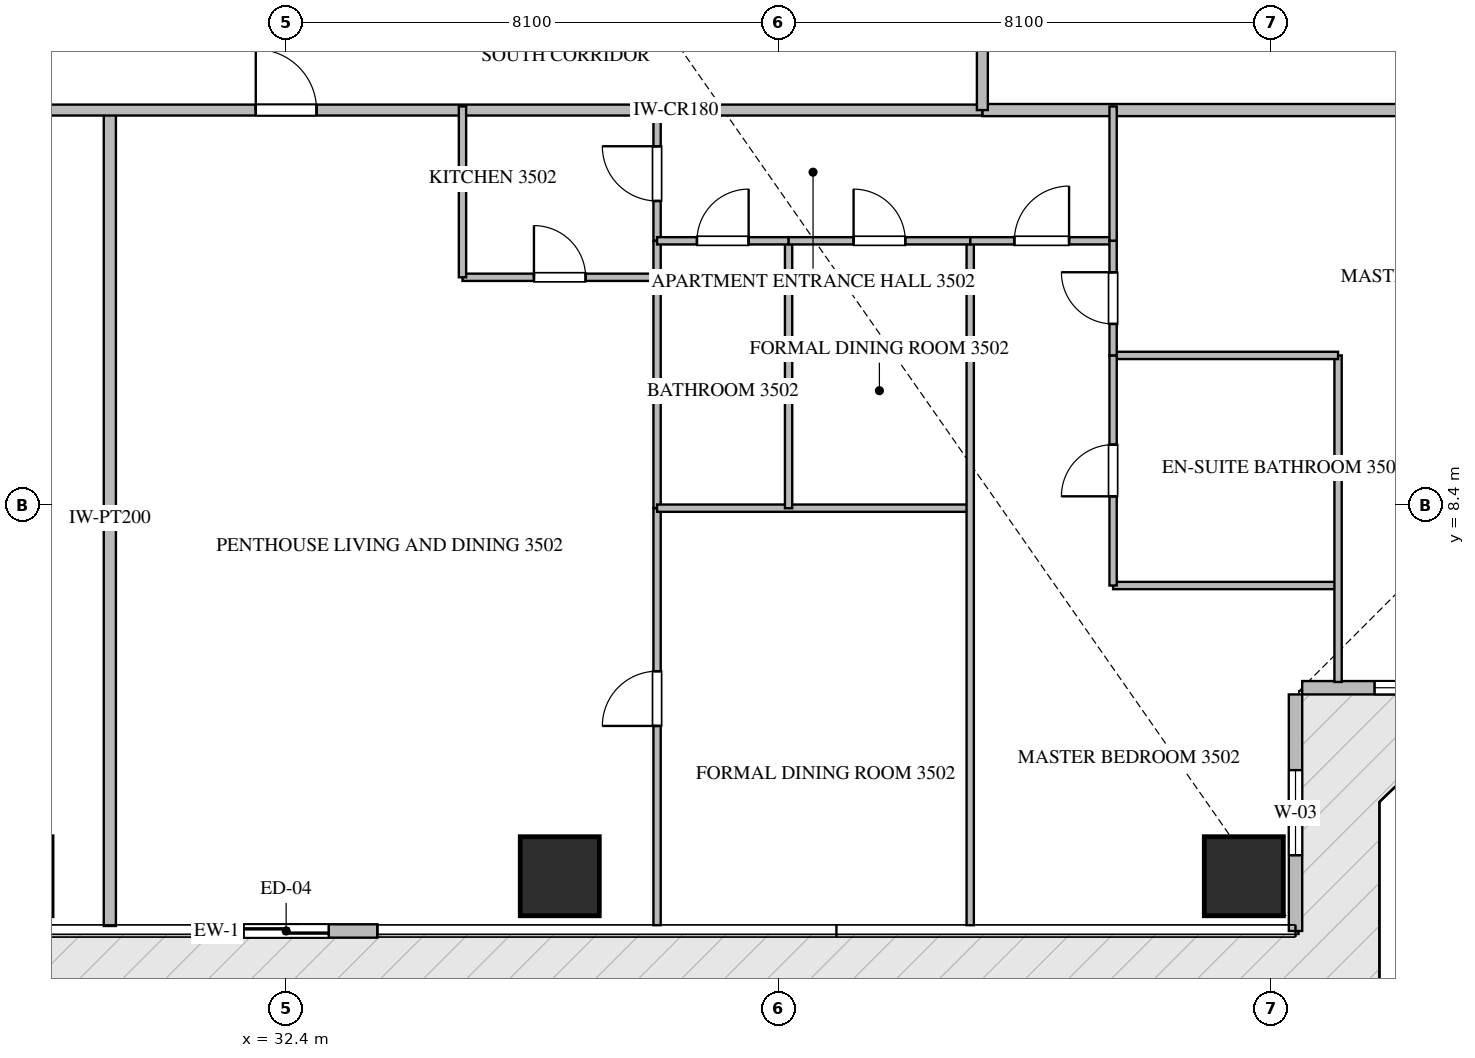
"""IFC4 building model, lengths in metres.
Left out: names, types, materials, properties, quantities, classifications, styles, units other than length and angle.
Written with IfcOpenShell. Run it as: python <this file> out.ifc"""

import sys

from ifc_helpers import new_model, si_unit, direction, frame, frame_2d, origin, origin_2d, place, context, subcontext, project, spatial, rectangle, extrude, source, transform, mapped, element, fill, save


model = new_model("IFC4")
c1 = context("Model", 3, precision=1e-05, world=origin(), true_north=direction((0.0, 1.0)))
c2 = subcontext(c1, "Body", "Model", "MODEL_VIEW")
j1 = project(units=[si_unit("LENGTHUNIT", "METRE"), si_unit("PLANEANGLEUNIT", "RADIAN")], contexts=[c1])
p1 = place(None, origin())
s1 = spatial("IfcSite", under=j1, at=p1, CompositionType="ELEMENT")
p2 = place(p1, origin())
s2 = spatial("IfcBuilding", under=s1, at=p2, CompositionType="ELEMENT")
p3 = place(p2, frame((0.0, 0.0, 142.65)))
s3 = spatial("IfcBuildingStorey", under=s2, at=p3, CompositionType="ELEMENT", Elevation=142.65)
m1 = source(origin(), c2, "Body", "SweptSolid", [
    extrude(rectangle(XDim=1.3, YDim=1.3, at=origin_2d()), origin(), (0.0, 0.0, 1.0), 3.75),
])
for number, where, z_axis, x_axis in (
    (1, (36.9, 2.3, -0.26), (0.0, 0.0, 1.0), (1.0, 0.0, 0.0)),
    (2, (48.15, 2.3, -0.26), (0.0, 0.0, 1.0), (1.0, 0.0, 0.0)),
):
    element("IfcColumn", number, at=place(p3, frame(where, z_axis=z_axis, x_axis=x_axis)), inside=s3, PredefinedType="COLUMN", context=c2, shape_type="MappedRepresentation", body=[
        mapped(m1, transform((0.0, 0.0, 0.0), scale=1.0)),
    ])
p4 = place(p3, frame((30.9, 1.4, 0.0), z_axis=(0.0, 0.0, 1.0), x_axis=(1.0, 0.0, 0.0)))
e3 = element("IfcWall", 3, at=p4, inside=s3, PredefinedType="ELEMENTEDWALL", context=c2, shape_type="SweptSolid", body=[
    extrude(rectangle(XDim=3.0, YDim=0.22, at=frame_2d((1.5, 0.0))), origin(), (0.0, 0.0, 1.0), 3.475),
])
p5 = place(p4, frame((0.8, 0.0, 0.0)))
e4 = element("IfcOpeningElement", 4, at=p5, cuts=e3, PredefinedType="OPENING", context=c2, shape_type="SweptSolid", body=[
    extrude(rectangle(XDim=1.4, YDim=2.25, at=frame_2d((0.7, 1.125))), frame((0.0, 0.12, 0.0), z_axis=(0.0, -1.0, 0.0), x_axis=(1.0, 0.0, 0.0)), (0.0, 0.0, 1.0), 0.24),
])
p6 = place(p3, frame((49.0, 1.4, 0.0), z_axis=(0.0, 0.0, 1.0), x_axis=(0.0, 1.0, 0.0)))
e5 = element("IfcWall", 5, at=p6, inside=s3, PredefinedType="ELEMENTEDWALL", context=c2, shape_type="SweptSolid", body=[
    extrude(rectangle(XDim=3.89, YDim=0.22, at=frame_2d((1.945, 0.0))), origin(), (0.0, 0.0, 1.0), 3.475),
])
p7 = place(p6, frame((1.245, 0.0, 0.65)))
e6 = element("IfcOpeningElement", 6, at=p7, cuts=e5, PredefinedType="OPENING", context=c2, shape_type="SweptSolid", body=[
    extrude(rectangle(XDim=1.4, YDim=2.05, at=frame_2d((0.7, 1.025))), frame((0.0, 0.12, 0.0), z_axis=(0.0, -1.0, 0.0), x_axis=(1.0, 0.0, 0.0)), (0.0, 0.0, 1.0), 0.24),
])
p8 = place(p3, frame((49.11, 5.4, 0.0), z_axis=(0.0, 0.0, 1.0), x_axis=(1.0, 0.0, 0.0)))
e7 = element("IfcWall", 7, at=p8, inside=s3, PredefinedType="ELEMENTEDWALL", context=c2, shape_type="SweptSolid", body=[
    extrude(rectangle(XDim=3.78, YDim=0.22, at=frame_2d((1.89, 0.0))), origin(), (0.0, 0.0, 1.0), 3.475),
])
p9 = place(p8, frame((1.19, 0.0, 0.65)))
e8 = element("IfcOpeningElement", 8, at=p9, cuts=e7, PredefinedType="OPENING", context=c2, shape_type="SweptSolid", body=[
    extrude(rectangle(XDim=1.4, YDim=2.05, at=frame_2d((0.7, 1.025))), frame((0.0, 0.12, 0.0), z_axis=(0.0, -1.0, 0.0), x_axis=(1.0, 0.0, 0.0)), (0.0, 0.0, 1.0), 0.24),
])
p10 = place(p3, frame((29.5, 1.482, 0.0), z_axis=(0.0, 0.0, 1.0), x_axis=(0.0, 1.0, 0.0)))
e9 = element("IfcWall", 9, at=p10, inside=s3, PredefinedType="PARTITIONING", context=c2, shape_type="SweptSolid", body=[
    extrude(rectangle(XDim=13.418, YDim=0.2, at=frame_2d((6.709, 0.0))), origin(), (0.0, 0.0, 1.0), 3.49),
])
p11 = place(p3, frame((43.85, 14.9, 0.0), z_axis=(0.0, 0.0, 1.0), x_axis=(1.0, 0.0, 0.0)))
e10 = element("IfcWall", 10, at=p11, inside=s3, PredefinedType="PARTITIONING", context=c2, shape_type="SweptSolid", body=[
    extrude(rectangle(XDim=13.068, YDim=0.2, at=frame_2d((6.534, 0.0))), origin(), (0.0, 0.0, 1.0), 3.49),
])
p12 = place(p3, frame((20.952, 14.9, 0.0), z_axis=(0.0, 0.0, 1.0), x_axis=(1.0, 0.0, 0.0)))
e11 = element("IfcWall", 11, at=p12, inside=s3, PredefinedType="PARTITIONING", context=c2, shape_type="SweptSolid", body=[
    extrude(rectangle(XDim=22.896, YDim=0.18, at=frame_2d((11.448, 0.0))), origin(), (0.0, 0.0, 1.0), 3.49),
])
p13 = place(p12, frame((5.386, 0.0, 0.0)))
e12 = element("IfcOpeningElement", 12, at=p13, cuts=e11, PredefinedType="OPENING", context=c2, shape_type="SweptSolid", body=[
    extrude(rectangle(XDim=1.0, YDim=2.15, at=frame_2d((0.5, 1.075))), frame((0.0, 0.1, 0.0), z_axis=(0.0, -1.0, 0.0), x_axis=(1.0, 0.0, 0.0)), (0.0, 0.0, 1.0), 0.2),
])
p14 = place(p12, frame((10.948, 0.0, 0.0)))
e13 = element("IfcOpeningElement", 13, at=p14, cuts=e11, PredefinedType="OPENING", context=c2, shape_type="SweptSolid", body=[
    extrude(rectangle(XDim=1.0, YDim=2.15, at=frame_2d((0.5, 1.075))), frame((0.0, 0.1, 0.0), z_axis=(0.0, -1.0, 0.0), x_axis=(1.0, 0.0, 0.0)), (0.0, 0.0, 1.0), 0.2),
])
p15 = place(p3, frame((43.85, 14.9, 0.0), z_axis=(0.0, 0.0, 1.0), x_axis=(0.0, 1.0, 0.0)))
e14 = element("IfcWall", 14, at=p15, inside=s3, PredefinedType="PARTITIONING", context=c2, shape_type="SweptSolid", body=[
    extrude(rectangle(XDim=18.7, YDim=0.18, at=frame_2d((9.35, 0.0))), origin(), (0.0, 0.0, 1.0), 3.49),
])
p16 = place(p15, frame((1.805, 0.0, 0.0)))
e15 = element("IfcOpeningElement", 15, at=p16, cuts=e14, PredefinedType="OPENING", context=c2, shape_type="SweptSolid", body=[
    extrude(rectangle(XDim=1.0, YDim=2.15, at=frame_2d((0.5, 1.075))), frame((0.0, 0.1, 0.0), z_axis=(0.0, -1.0, 0.0), x_axis=(1.0, 0.0, 0.0)), (0.0, 0.0, 1.0), 0.2),
])
p17 = place(p15, frame((15.222, 0.0, 0.0)))
e16 = element("IfcOpeningElement", 16, at=p17, cuts=e14, PredefinedType="OPENING", context=c2, shape_type="SweptSolid", body=[
    extrude(rectangle(XDim=1.0, YDim=2.15, at=frame_2d((0.5, 1.075))), frame((0.0, 0.1, 0.0), z_axis=(0.0, -1.0, 0.0), x_axis=(1.0, 0.0, 0.0)), (0.0, 0.0, 1.0), 0.2),
])
p18 = place(p3, frame((35.3, 12.15, 0.0), z_axis=(0.0, 0.0, 1.0), x_axis=(1.0, 0.0, 0.0)))
e17 = element("IfcWall", 17, at=p18, inside=s3, PredefinedType="PARTITIONING", context=c2, shape_type="SweptSolid", body=[
    extrude(rectangle(XDim=3.2, YDim=0.12, at=frame_2d((1.6, 0.0))), origin(), (0.0, 0.0, 1.0), 3.49),
])
p19 = place(p18, frame((1.175, 0.0, 0.0)))
e18 = element("IfcOpeningElement", 18, at=p19, cuts=e17, PredefinedType="OPENING", context=c2, shape_type="SweptSolid", body=[
    extrude(rectangle(XDim=0.85, YDim=2.1, at=frame_2d((0.425, 1.05))), frame((0.0, 0.07, 0.0), z_axis=(0.0, -1.0, 0.0), x_axis=(1.0, 0.0, 0.0)), (0.0, 0.0, 1.0), 0.14),
])
p20 = place(p3, frame((35.3, 12.15, 0.0), z_axis=(0.0, 0.0, 1.0), x_axis=(0.0, 1.0, 0.0)))
e19 = element("IfcWall", 19, at=p20, inside=s3, PredefinedType="PARTITIONING", context=c2, shape_type="SweptSolid", body=[
    extrude(rectangle(XDim=2.81, YDim=0.12, at=frame_2d((1.405, 0.0))), origin(), (0.0, 0.0, 1.0), 3.49),
])
p21 = place(p3, frame((38.5, 12.75, 0.0), z_axis=(0.0, 0.0, 1.0), x_axis=(0.0, 1.0, 0.0)))
e20 = element("IfcWall", 20, at=p21, inside=s3, PredefinedType="PARTITIONING", context=c2, shape_type="SweptSolid", body=[
    extrude(rectangle(XDim=2.21, YDim=0.12, at=frame_2d((1.105, 0.0))), origin(), (0.0, 0.0, 1.0), 3.49),
])
p22 = place(p21, frame((0.655, 0.0, 0.0)))
e21 = element("IfcOpeningElement", 21, at=p22, cuts=e20, PredefinedType="OPENING", context=c2, shape_type="SweptSolid", body=[
    extrude(rectangle(XDim=0.9, YDim=2.1, at=frame_2d((0.45, 1.05))), frame((0.0, 0.07, 0.0), z_axis=(0.0, -1.0, 0.0), x_axis=(1.0, 0.0, 0.0)), (0.0, 0.0, 1.0), 0.14),
])
p23 = place(p3, frame((38.5, 1.495, 0.0), z_axis=(0.0, 0.0, 1.0), x_axis=(0.0, 1.0, 0.0)))
e22 = element("IfcWall", 22, at=p23, inside=s3, PredefinedType="PARTITIONING", context=c2, shape_type="SweptSolid", body=[
    extrude(rectangle(XDim=6.858, YDim=0.12, at=frame_2d((3.429, 0.0))), origin(), (0.0, 0.0, 1.0), 3.49),
])
p24 = place(p23, frame((3.277, 0.0, 0.0)))
e23 = element("IfcOpeningElement", 23, at=p24, cuts=e22, PredefinedType="OPENING", context=c2, shape_type="SweptSolid", body=[
    extrude(rectangle(XDim=0.9, YDim=2.1, at=frame_2d((0.45, 1.05))), frame((0.0, 0.07, 0.0), z_axis=(0.0, -1.0, 0.0), x_axis=(1.0, 0.0, 0.0)), (0.0, 0.0, 1.0), 0.14),
])
p25 = place(p3, frame((38.5, 8.355, 0.0), z_axis=(0.0, 0.0, 1.0), x_axis=(0.0, 1.0, 0.0)))
e24 = element("IfcWall", 24, at=p25, inside=s3, PredefinedType="PARTITIONING", context=c2, shape_type="SweptSolid", body=[
    extrude(rectangle(XDim=4.393, YDim=0.12, at=frame_2d((2.197, 0.0))), origin(), (0.0, 0.0, 1.0), 3.49),
])
p26 = place(p3, frame((38.5, 8.353, 0.0), z_axis=(0.0, 0.0, 1.0), x_axis=(1.0, 0.0, 0.0)))
e25 = element("IfcWall", 25, at=p26, inside=s3, PredefinedType="PARTITIONING", context=c2, shape_type="SweptSolid", body=[
    extrude(rectangle(XDim=5.15, YDim=0.12, at=frame_2d((2.575, 0.0))), origin(), (0.0, 0.0, 1.0), 3.49),
])
p27 = place(p3, frame((43.65, 1.495, 0.0), z_axis=(0.0, 0.0, 1.0), x_axis=(0.0, 1.0, 0.0)))
e26 = element("IfcWall", 26, at=p27, inside=s3, PredefinedType="PARTITIONING", context=c2, shape_type="SweptSolid", body=[
    extrude(rectangle(XDim=11.255, YDim=0.12, at=frame_2d((5.627, 0.0))), origin(), (0.0, 0.0, 1.0), 3.49),
])
p28 = place(p3, frame((40.663, 8.353, 0.0), z_axis=(0.0, 0.0, 1.0), x_axis=(0.0, 1.0, 0.0)))
e27 = element("IfcWall", 27, at=p28, inside=s3, PredefinedType="PARTITIONING", context=c2, shape_type="SweptSolid", body=[
    extrude(rectangle(XDim=4.397, YDim=0.12, at=frame_2d((2.198, 0.0))), origin(), (0.0, 0.0, 1.0), 3.49),
])
p29 = place(p3, frame((38.5, 12.75, 0.0), z_axis=(0.0, 0.0, 1.0), x_axis=(1.0, 0.0, 0.0)))
e28 = element("IfcWall", 28, at=p29, inside=s3, PredefinedType="PARTITIONING", context=c2, shape_type="SweptSolid", body=[
    extrude(rectangle(XDim=2.163, YDim=0.12, at=frame_2d((1.082, 0.0))), origin(), (0.0, 0.0, 1.0), 3.49),
])
p30 = place(p29, frame((0.656, 0.0, 0.0)))
e29 = element("IfcOpeningElement", 29, at=p30, cuts=e28, PredefinedType="OPENING", context=c2, shape_type="SweptSolid", body=[
    extrude(rectangle(XDim=0.85, YDim=2.1, at=frame_2d((0.425, 1.05))), frame((0.0, 0.07, 0.0), z_axis=(0.0, -1.0, 0.0), x_axis=(1.0, 0.0, 0.0)), (0.0, 0.0, 1.0), 0.14),
])
p31 = place(p3, frame((40.665, 12.75, 0.0), z_axis=(0.0, 0.0, 1.0), x_axis=(1.0, 0.0, 0.0)))
e30 = element("IfcWall", 30, at=p31, inside=s3, PredefinedType="PARTITIONING", context=c2, shape_type="SweptSolid", body=[
    extrude(rectangle(XDim=2.985, YDim=0.12, at=frame_2d((1.492, 0.0))), origin(), (0.0, 0.0, 1.0), 3.49),
])
p32 = place(p31, frame((1.067, 0.0, 0.0)))
e31 = element("IfcOpeningElement", 31, at=p32, cuts=e30, PredefinedType="OPENING", context=c2, shape_type="SweptSolid", body=[
    extrude(rectangle(XDim=0.85, YDim=2.1, at=frame_2d((0.425, 1.05))), frame((0.0, 0.07, 0.0), z_axis=(0.0, -1.0, 0.0), x_axis=(1.0, 0.0, 0.0)), (0.0, 0.0, 1.0), 0.14),
])
p33 = place(p3, frame((43.652, 12.75, 0.0), z_axis=(0.0, 0.0, 1.0), x_axis=(1.0, 0.0, 0.0)))
e32 = element("IfcWall", 32, at=p33, inside=s3, PredefinedType="PARTITIONING", context=c2, shape_type="SweptSolid", body=[
    extrude(rectangle(XDim=2.348, YDim=0.12, at=frame_2d((1.174, 0.0))), origin(), (0.0, 0.0, 1.0), 3.49),
])
p34 = place(p33, frame((0.724, 0.0, 0.0)))
e33 = element("IfcOpeningElement", 33, at=p34, cuts=e32, PredefinedType="OPENING", context=c2, shape_type="SweptSolid", body=[
    extrude(rectangle(XDim=0.9, YDim=2.1, at=frame_2d((0.45, 1.05))), frame((0.0, 0.07, 0.0), z_axis=(0.0, -1.0, 0.0), x_axis=(1.0, 0.0, 0.0)), (0.0, 0.0, 1.0), 0.14),
])
p35 = place(p3, frame((46.0, 7.081, 0.0), z_axis=(0.0, 0.0, 1.0), x_axis=(1.0, 0.0, 0.0)))
e34 = element("IfcWall", 34, at=p35, inside=s3, PredefinedType="PARTITIONING", context=c2, shape_type="SweptSolid", body=[
    extrude(rectangle(XDim=3.7, YDim=0.12, at=frame_2d((1.85, 0.0))), origin(), (0.0, 0.0, 1.0), 3.49),
])
p36 = place(p3, frame((49.7, 5.495, 0.0), z_axis=(0.0, 0.0, 1.0), x_axis=(0.0, 1.0, 0.0)))
e35 = element("IfcWall", 35, at=p36, inside=s3, PredefinedType="PARTITIONING", context=c2, shape_type="SweptSolid", body=[
    extrude(rectangle(XDim=5.37, YDim=0.12, at=frame_2d((2.685, 0.0))), origin(), (0.0, 0.0, 1.0), 3.49),
])
p37 = place(p3, frame((46.0, 10.865, 0.0), z_axis=(0.0, 0.0, 1.0), x_axis=(1.0, 0.0, 0.0)))
e36 = element("IfcWall", 36, at=p37, inside=s3, PredefinedType="PARTITIONING", context=c2, shape_type="SweptSolid", body=[
    extrude(rectangle(XDim=3.7, YDim=0.12, at=frame_2d((1.85, 0.0))), origin(), (0.0, 0.0, 1.0), 3.49),
])
p38 = place(p3, frame((46.0, 7.081, 0.0), z_axis=(0.0, 0.0, 1.0), x_axis=(0.0, 1.0, 0.0)))
e37 = element("IfcWall", 37, at=p38, inside=s3, PredefinedType="PARTITIONING", context=c2, shape_type="SweptSolid", body=[
    extrude(rectangle(XDim=3.784, YDim=0.12, at=frame_2d((1.892, 0.0))), origin(), (0.0, 0.0, 1.0), 3.49),
])
p39 = place(p38, frame((1.467, 0.0, 0.0)))
e38 = element("IfcOpeningElement", 38, at=p39, cuts=e37, PredefinedType="OPENING", context=c2, shape_type="SweptSolid", body=[
    extrude(rectangle(XDim=0.85, YDim=2.1, at=frame_2d((0.425, 1.05))), frame((0.0, 0.07, 0.0), z_axis=(0.0, -1.0, 0.0), x_axis=(1.0, 0.0, 0.0)), (0.0, 0.0, 1.0), 0.14),
])
p40 = place(p3, frame((46.0, 10.867, 0.0), z_axis=(0.0, 0.0, 1.0), x_axis=(0.0, 1.0, 0.0)))
e39 = element("IfcWall", 39, at=p40, inside=s3, PredefinedType="PARTITIONING", context=c2, shape_type="SweptSolid", body=[
    extrude(rectangle(XDim=1.883, YDim=0.12, at=frame_2d((0.941, 0.0))), origin(), (0.0, 0.0, 1.0), 3.49),
])
p41 = place(p40, frame((0.516, 0.0, 0.0)))
e40 = element("IfcOpeningElement", 40, at=p41, cuts=e39, PredefinedType="OPENING", context=c2, shape_type="SweptSolid", body=[
    extrude(rectangle(XDim=0.85, YDim=2.1, at=frame_2d((0.425, 1.05))), frame((0.0, 0.07, 0.0), z_axis=(0.0, -1.0, 0.0), x_axis=(1.0, 0.0, 0.0)), (0.0, 0.0, 1.0), 0.14),
])
p42 = place(p3, frame((46.0, 12.752, 0.0), z_axis=(0.0, 0.0, 1.0), x_axis=(0.0, 1.0, 0.0)))
e41 = element("IfcWall", 41, at=p42, inside=s3, PredefinedType="PARTITIONING", context=c2, shape_type="SweptSolid", body=[
    extrude(rectangle(XDim=2.208, YDim=0.12, at=frame_2d((1.104, 0.0))), origin(), (0.0, 0.0, 1.0), 3.49),
])
m2 = source(origin(), c2, "Body", "SweptSolid", [
    extrude(rectangle(XDim=1.4, YDim=2.25, at=frame_2d((0.7, 1.125))), frame((0.0, 0.025, 0.0), z_axis=(0.0, -1.0, 0.0), x_axis=(1.0, 0.0, 0.0)), (0.0, 0.0, 1.0), 0.05),
])
p43 = place(p5, origin())
e42 = element("IfcDoor", 42, at=p43, inside=s3, OperationType="SLIDING_TO_LEFT", PredefinedType="DOOR", context=c2, shape_type="MappedRepresentation", body=[
    mapped(m2, transform((0.0, 0.0, 0.0), scale=1.0)),
])
fill(e4, e42)
m3 = source(origin(), c2, "Body", "SweptSolid", [
    extrude(rectangle(XDim=1.4, YDim=2.05, at=frame_2d((0.7, 1.025))), frame((0.0, 0.03, 0.0), z_axis=(0.0, -1.0, 0.0), x_axis=(1.0, 0.0, 0.0)), (0.0, 0.0, 1.0), 0.06),
])
p44 = place(p7, origin())
e43 = element("IfcWindow", 43, at=p44, inside=s3, PartitioningType="SINGLE_PANEL", PredefinedType="WINDOW", context=c2, shape_type="MappedRepresentation", body=[
    mapped(m3, transform((0.0, 0.0, 0.0), scale=1.0)),
])
fill(e6, e43)
p45 = place(p9, origin())
e44 = element("IfcWindow", 44, at=p45, inside=s3, PartitioningType="SINGLE_PANEL", PredefinedType="WINDOW", context=c2, shape_type="MappedRepresentation", body=[
    mapped(m3, transform((0.0, 0.0, 0.0), scale=1.0)),
])
fill(e8, e44)
m4 = source(origin(), c2, "Body", "SweptSolid", [
    extrude(rectangle(XDim=1.0, YDim=2.15, at=frame_2d((0.5, 1.075))), frame((0.0, 0.025, 0.0), z_axis=(0.0, -1.0, 0.0), x_axis=(1.0, 0.0, 0.0)), (0.0, 0.0, 1.0), 0.05),
])
p46 = place(p14, origin())
e45 = element("IfcDoor", 45, at=p46, inside=s3, OperationType="SINGLE_SWING_LEFT", PredefinedType="DOOR", context=c2, shape_type="MappedRepresentation", body=[
    mapped(m4, transform((0.0, 0.0, 0.0), scale=1.0)),
])
fill(e13, e45)
m5 = source(origin(), c2, "Body", "SweptSolid", [
    extrude(rectangle(XDim=0.85, YDim=2.1, at=frame_2d((0.425, 1.05))), frame((0.0, 0.025, 0.0), z_axis=(0.0, -1.0, 0.0), x_axis=(1.0, 0.0, 0.0)), (0.0, 0.0, 1.0), 0.05),
])
p47 = place(p19, origin())
e46 = element("IfcDoor", 46, at=p47, inside=s3, OperationType="SINGLE_SWING_LEFT", PredefinedType="DOOR", context=c2, shape_type="MappedRepresentation", body=[
    mapped(m5, transform((0.0, 0.0, 0.0), scale=1.0)),
])
fill(e18, e46)
m6 = source(origin(), c2, "Body", "SweptSolid", [
    extrude(rectangle(XDim=0.9, YDim=2.1, at=frame_2d((0.45, 1.05))), frame((0.0, 0.025, 0.0), z_axis=(0.0, -1.0, 0.0), x_axis=(1.0, 0.0, 0.0)), (0.0, 0.0, 1.0), 0.05),
])
p48 = place(p22, origin())
e47 = element("IfcDoor", 47, at=p48, inside=s3, OperationType="SINGLE_SWING_RIGHT", PredefinedType="DOOR", context=c2, shape_type="MappedRepresentation", body=[
    mapped(m6, transform((0.0, 0.0, 0.0), scale=1.0)),
])
fill(e21, e47)
p49 = place(p24, origin())
e48 = element("IfcDoor", 48, at=p49, inside=s3, OperationType="SINGLE_SWING_LEFT", PredefinedType="DOOR", context=c2, shape_type="MappedRepresentation", body=[
    mapped(m6, transform((0.0, 0.0, 0.0), scale=1.0)),
])
fill(e23, e48)
p50 = place(p30, origin())
e49 = element("IfcDoor", 49, at=p50, inside=s3, OperationType="SINGLE_SWING_RIGHT", PredefinedType="DOOR", context=c2, shape_type="MappedRepresentation", body=[
    mapped(m5, transform((0.0, 0.0, 0.0), scale=1.0)),
])
fill(e29, e49)
p51 = place(p32, origin())
e50 = element("IfcDoor", 50, at=p51, inside=s3, OperationType="SINGLE_SWING_LEFT", PredefinedType="DOOR", context=c2, shape_type="MappedRepresentation", body=[
    mapped(m5, transform((0.0, 0.0, 0.0), scale=1.0)),
])
fill(e31, e50)
p52 = place(p34, origin())
e51 = element("IfcDoor", 51, at=p52, inside=s3, OperationType="SINGLE_SWING_RIGHT", PredefinedType="DOOR", context=c2, shape_type="MappedRepresentation", body=[
    mapped(m6, transform((0.0, 0.0, 0.0), scale=1.0)),
])
fill(e33, e51)
p53 = place(p39, origin())
e52 = element("IfcDoor", 52, at=p53, inside=s3, OperationType="SINGLE_SWING_LEFT", PredefinedType="DOOR", context=c2, shape_type="MappedRepresentation", body=[
    mapped(m5, transform((0.0, 0.0, 0.0), scale=1.0)),
])
fill(e38, e52)
p54 = place(p41, origin())
e53 = element("IfcDoor", 53, at=p54, inside=s3, OperationType="SINGLE_SWING_RIGHT", PredefinedType="DOOR", context=c2, shape_type="MappedRepresentation", body=[
    mapped(m5, transform((0.0, 0.0, 0.0), scale=1.0)),
])
fill(e40, e53)
save(model, sys.argv[1])
